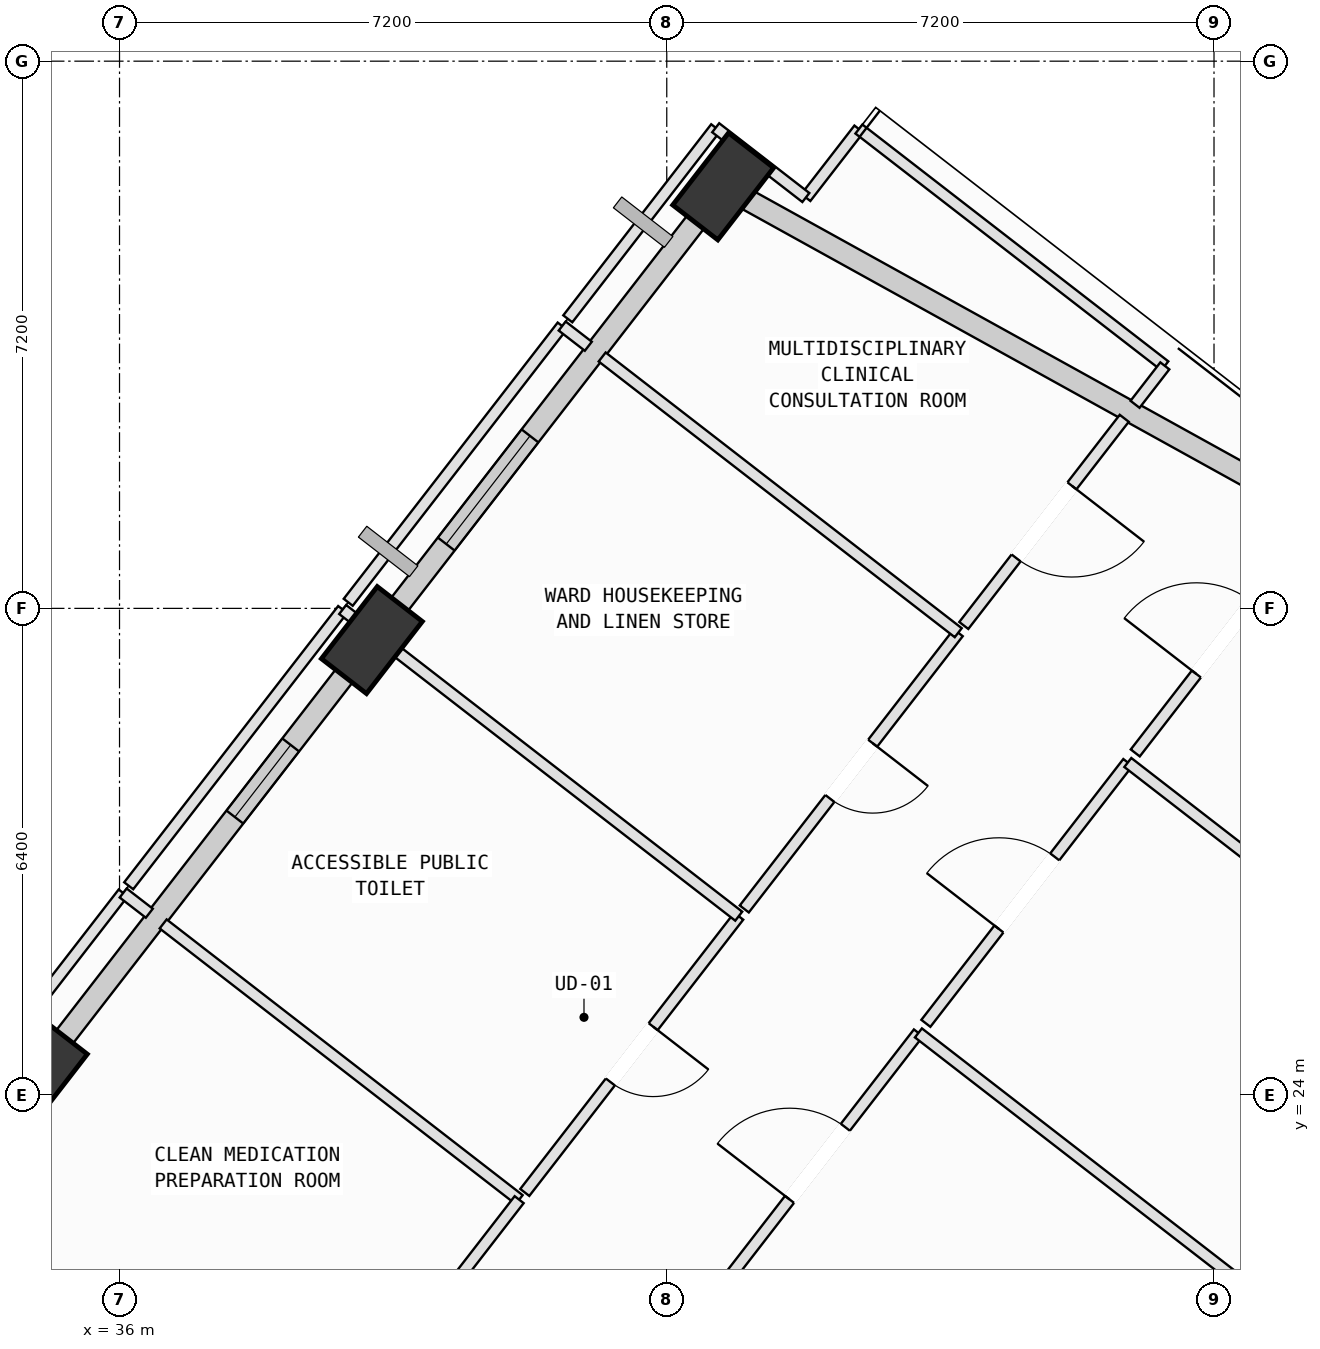
"""IFC4 building model, lengths in metres.
Left out: names, types, materials, properties, quantities, classifications, styles, units other than length and angle.
Written with IfcOpenShell. Run it as: python <this file> out.ifc"""

import sys

from ifc_helpers import new_model, si_unit, direction, frame, frame_2d, origin, origin_2d, place, context, subcontext, project, spatial, rectangle, extrude, element, fill, save


model = new_model("IFC4")
c1 = context("Model", 3, precision=1e-05, world=origin(), true_north=direction((0.0, 1.0)))
c2 = subcontext(c1, "Body", "Model", "MODEL_VIEW")
j1 = project(units=[si_unit("LENGTHUNIT", "METRE"), si_unit("PLANEANGLEUNIT", "RADIAN")], contexts=[c1])
p1 = place(None, origin())
s1 = spatial("IfcSite", under=j1, at=p1, CompositionType="ELEMENT")
p2 = place(p1, origin())
s2 = spatial("IfcBuilding", under=s1, at=p2, CompositionType="ELEMENT")
p3 = place(p2, frame((0.0, 0.0, 247.2)))
s3 = spatial("IfcBuildingStorey", under=s2, at=p3, CompositionType="ELEMENT", Elevation=247.2)
p4 = place(p3, frame((43.942, 35.953, 0.002), z_axis=(-0.046459283818, 0.042374281172, 0.998021019439), x_axis=(0.170478733113, -0.984106179386, 0.049719505731)))
e1 = element("IfcColumn", 1, at=p4, inside=s3, PredefinedType="COLUMN", context=c2, shape_type="SweptSolid", body=[
    extrude(rectangle(XDim=1.2, YDim=0.75, at=origin_2d()), origin(), (0.0, 0.0, 1.0), 4.004),
])
p5 = place(p3, frame((39.32, 29.983, 0.002), z_axis=(-0.021676245466, 0.023508040858, 0.999488625447), x_axis=(0.08563788715, -0.996005473508, 0.025283374503)))
e2 = element("IfcColumn", 2, at=p5, inside=s3, PredefinedType="COLUMN", context=c2, shape_type="SweptSolid", body=[
    extrude(rectangle(XDim=1.2, YDim=0.75, at=origin_2d()), origin(), (0.0, 0.0, 1.0), 3.998),
])
p6 = place(p3, frame((34.912, 24.29, 0.002), z_axis=(0.00207706177, 0.005437014634, 0.9999830622), x_axis=(-0.854072816538, -0.52013310368, 0.00460201124)))
e3 = element("IfcColumn", 3, at=p6, inside=s3, PredefinedType="COLUMN", context=c2, shape_type="SweptSolid", body=[
    extrude(rectangle(XDim=1.2, YDim=0.75, at=origin_2d()), origin(), (0.0, 0.0, 1.0), 3.996),
])
p7 = place(p3, frame((44.182, 35.82, 0.0), z_axis=(0.0, 0.0, 1.0), x_axis=(0.874960254065, -0.48419474781, 0.0)))
e4 = element("IfcWall", 4, at=p7, inside=s3, PredefinedType="SOLIDWALL", context=c2, shape_type="SweptSolid", body=[
    extrude(rectangle(XDim=9.036, YDim=0.28, at=frame_2d((4.518, 0.0))), origin(), (0.0, 0.0, 1.0), 3.265),
])
p8 = place(p3, frame((39.567, 30.302, 0.0), z_axis=(0.0, 0.0, 1.0), x_axis=(0.612201517758, 0.790701777951, 0.0)))
e5 = element("IfcWall", 5, at=p8, inside=s3, PredefinedType="SOLIDWALL", context=c2, shape_type="SweptSolid", body=[
    extrude(rectangle(XDim=6.78, YDim=0.28, at=frame_2d((3.39, 0.0))), origin(), (0.0, 0.0, 1.0), 3.265),
])
p9 = place(p8, frame((1.195, 0.0, 0.75)))
e6 = element("IfcOpeningElement", 6, at=p9, cuts=e5, PredefinedType="OPENING", context=c2, shape_type="SweptSolid", body=[
    extrude(rectangle(XDim=1.8, YDim=2.05, at=frame_2d((0.9, 1.025))), frame((0.0, 0.15, 0.0), z_axis=(0.0, -1.0, 0.0), x_axis=(1.0, 0.0, 0.0)), (0.0, 0.0, 1.0), 0.3),
])
p10 = place(p3, frame((35.163, 24.613, 0.0), z_axis=(0.0, 0.0, 1.0), x_axis=(0.612185484871, 0.790714191167, 0.0)))
e7 = element("IfcWall", 7, at=p10, inside=s3, PredefinedType="SOLIDWALL", context=c2, shape_type="SweptSolid", body=[
    extrude(rectangle(XDim=6.409, YDim=0.28, at=frame_2d((3.205, 0.0))), origin(), (0.0, 0.0, 1.0), 3.265),
])
p11 = place(p10, frame((3.847, 0.0, 0.75)))
e8 = element("IfcOpeningElement", 8, at=p11, cuts=e7, PredefinedType="OPENING", context=c2, shape_type="SweptSolid", body=[
    extrude(rectangle(XDim=1.2, YDim=1.75, at=frame_2d((0.6, 0.875))), frame((0.0, 0.15, 0.0), z_axis=(0.0, -1.0, 0.0), x_axis=(1.0, 0.0, 0.0)), (0.0, 0.0, 1.0), 0.3),
])
p12 = place(p3, frame((43.854, 21.382, 0.0), z_axis=(0.0, 0.0, 1.0), x_axis=(0.612178865646, 0.790719315849, 0.0)))
e9 = element("IfcWall", 9, at=p12, inside=s3, PredefinedType="PARTITIONING", context=c2, shape_type="SweptSolid", body=[
    extrude(rectangle(XDim=4.34, YDim=0.15, at=frame_2d((2.17, 0.0))), origin(), (0.0, 0.0, 1.0), 3.78),
])
p13 = place(p12, frame((1.57, 0.0, 0.0)))
e10 = element("IfcOpeningElement", 10, at=p13, cuts=e9, PredefinedType="OPENING", context=c2, shape_type="SweptSolid", body=[
    extrude(rectangle(XDim=1.2, YDim=2.15, at=frame_2d((0.6, 1.075))), frame((0.0, 0.085, 0.0), z_axis=(0.0, -1.0, 0.0), x_axis=(1.0, 0.0, 0.0)), (0.0, 0.0, 1.0), 0.17),
])
p14 = place(p3, frame((46.511, 24.814, 0.0), z_axis=(0.0, 0.0, 1.0), x_axis=(0.790690807158, -0.612215687055, 0.0)))
e11 = element("IfcWall", 11, at=p14, inside=s3, PredefinedType="PARTITIONING", context=c2, shape_type="SweptSolid", body=[
    extrude(rectangle(XDim=11.935, YDim=0.15, at=frame_2d((5.968, 0.0))), origin(), (0.0, 0.0, 1.0), 3.78),
])
p15 = place(p3, frame((46.609, 24.94, 0.0), z_axis=(0.0, 0.0, 1.0), x_axis=(0.612186806235, 0.790713168141, 0.0)))
e12 = element("IfcWall", 12, at=p15, inside=s3, PredefinedType="PARTITIONING", context=c2, shape_type="SweptSolid", body=[
    extrude(rectangle(XDim=4.341, YDim=0.15, at=frame_2d((2.17, 0.0))), origin(), (0.0, 0.0, 1.0), 3.78),
])
p16 = place(p15, frame((1.57, 0.0, 0.0)))
e13 = element("IfcOpeningElement", 13, at=p16, cuts=e12, PredefinedType="OPENING", context=c2, shape_type="SweptSolid", body=[
    extrude(rectangle(XDim=1.2, YDim=2.15, at=frame_2d((0.6, 1.075))), frame((0.0, 0.085, 0.0), z_axis=(0.0, -1.0, 0.0), x_axis=(1.0, 0.0, 0.0)), (0.0, 0.0, 1.0), 0.17),
])
p17 = place(p3, frame((49.266, 28.372, 0.0), z_axis=(0.0, 0.0, 1.0), x_axis=(0.790648548944, -0.612270260631, 0.0)))
e14 = element("IfcWall", 14, at=p17, inside=s3, PredefinedType="PARTITIONING", context=c2, shape_type="SweptSolid", body=[
    extrude(rectangle(XDim=11.363, YDim=0.15, at=frame_2d((5.681, 0.0))), origin(), (0.0, 0.0, 1.0), 3.78),
])
p18 = place(p3, frame((49.364, 28.498, 0.0), z_axis=(0.0, 0.0, 1.0), x_axis=(0.612238811962, 0.790672901475, 0.0)))
e15 = element("IfcWall", 15, at=p18, inside=s3, PredefinedType="PARTITIONING", context=c2, shape_type="SweptSolid", body=[
    extrude(rectangle(XDim=3.827, YDim=0.15, at=frame_2d((1.914, 0.0))), origin(), (0.0, 0.0, 1.0), 3.78),
])
p19 = place(p18, frame((1.313, 0.0, 0.0)))
e16 = element("IfcOpeningElement", 16, at=p19, cuts=e15, PredefinedType="OPENING", context=c2, shape_type="SweptSolid", body=[
    extrude(rectangle(XDim=1.2, YDim=2.15, at=frame_2d((0.6, 1.075))), frame((0.0, 0.085, 0.0), z_axis=(0.0, -1.0, 0.0), x_axis=(1.0, 0.0, 0.0)), (0.0, 0.0, 1.0), 0.17),
])
p20 = place(p3, frame((33.233, 23.019, 0.0), z_axis=(0.0, 0.0, 1.0), x_axis=(0.612204246351, 0.790699665328, 0.0)))
e17 = element("IfcWall", 17, at=p20, inside=s3, PredefinedType="PARTITIONING", context=c2, shape_type="SweptSolid", body=[
    extrude(rectangle(XDim=4.598, YDim=0.15, at=frame_2d((2.299, 0.0))), origin(), (0.0, 0.0, 1.0), 3.78),
])
p21 = place(p3, frame((36.048, 26.655, 0.0), z_axis=(0.0, 0.0, 1.0), x_axis=(0.790951555594, -0.611878776151, 0.0)))
e18 = element("IfcWall", 18, at=p21, inside=s3, PredefinedType="PARTITIONING", context=c2, shape_type="SweptSolid", body=[
    extrude(rectangle(XDim=0.435, YDim=0.15, at=frame_2d((0.217, 0.0))), origin(), (0.0, 0.0, 1.0), 3.78),
])
p22 = place(p3, frame((36.574, 26.248, 0.0), z_axis=(0.0, 0.0, 1.0), x_axis=(0.790597576491, -0.612336077695, 0.0)))
e19 = element("IfcWall", 19, at=p22, inside=s3, PredefinedType="PARTITIONING", context=c2, shape_type="SweptSolid", body=[
    extrude(rectangle(XDim=5.925, YDim=0.15, at=frame_2d((2.962, 0.0))), origin(), (0.0, 0.0, 1.0), 3.78),
])
p23 = place(p3, frame((41.258, 22.62, 0.0), z_axis=(0.0, 0.0, 1.0), x_axis=(-0.612141082287, -0.790748566472, 0.0)))
e20 = element("IfcWall", 20, at=p23, inside=s3, PredefinedType="PARTITIONING", context=c2, shape_type="SweptSolid", body=[
    extrude(rectangle(XDim=2.454, YDim=0.15, at=frame_2d((1.227, 0.0))), origin(), (0.0, 0.0, 1.0), 3.78),
])
p24 = place(p3, frame((36.255, 20.68, 0.0), z_axis=(0.0, 0.0, 1.0), x_axis=(-0.79074544755, 0.612145111211, 0.0)))
e21 = element("IfcWall", 21, at=p24, inside=s3, PredefinedType="PARTITIONING", context=c2, shape_type="SweptSolid", body=[
    extrude(rectangle(XDim=3.156, YDim=0.15, at=frame_2d((1.578, 0.0))), origin(), (0.0, 0.0, 1.0), 3.78),
])
p25 = place(p3, frame((44.147, 26.35, 0.0), z_axis=(0.0, 0.0, 1.0), x_axis=(-0.612273865453, -0.790645757393, 0.0)))
e22 = element("IfcWall", 22, at=p25, inside=s3, PredefinedType="PARTITIONING", context=c2, shape_type="SweptSolid", body=[
    extrude(rectangle(XDim=4.597, YDim=0.15, at=frame_2d((2.299, 0.0))), origin(), (0.0, 0.0, 1.0), 3.78),
])
p26 = place(p25, frame((1.839, 0.0, 0.0)))
e23 = element("IfcOpeningElement", 23, at=p26, cuts=e22, PredefinedType="OPENING", context=c2, shape_type="SweptSolid", body=[
    extrude(rectangle(XDim=0.92, YDim=2.1, at=frame_2d((0.46, 1.05))), frame((0.0, 0.085, 0.0), z_axis=(0.0, -1.0, 0.0), x_axis=(1.0, 0.0, 0.0)), (0.0, 0.0, 1.0), 0.17),
])
p27 = place(p3, frame((36.121, 26.75, 0.0), z_axis=(0.0, 0.0, 1.0), x_axis=(0.612273865453, 0.790645757393, 0.0)))
e24 = element("IfcWall", 24, at=p27, inside=s3, PredefinedType="PARTITIONING", context=c2, shape_type="SweptSolid", body=[
    extrude(rectangle(XDim=4.597, YDim=0.15, at=frame_2d((2.299, 0.0))), origin(), (0.0, 0.0, 1.0), 3.265),
])
p28 = place(p3, frame((38.936, 30.385, 0.0), z_axis=(0.0, 0.0, 1.0), x_axis=(0.790676851413, -0.6122337108, 0.0)))
e25 = element("IfcWall", 25, at=p28, inside=s3, PredefinedType="PARTITIONING", context=c2, shape_type="SweptSolid", body=[
    extrude(rectangle(XDim=6.591, YDim=0.15, at=frame_2d((3.295, 0.0))), origin(), (0.0, 0.0, 1.0), 3.78),
])
p29 = place(p3, frame((47.035, 30.08, 0.0), z_axis=(0.0, 0.0, 1.0), x_axis=(-0.612273865453, -0.790645757393, 0.0)))
e26 = element("IfcWall", 26, at=p29, inside=s3, PredefinedType="PARTITIONING", context=c2, shape_type="SweptSolid", body=[
    extrude(rectangle(XDim=4.597, YDim=0.15, at=frame_2d((2.299, 0.0))), origin(), (0.0, 0.0, 1.0), 3.78),
])
p30 = place(p29, frame((1.839, 0.0, 0.0)))
e27 = element("IfcOpeningElement", 27, at=p30, cuts=e26, PredefinedType="OPENING", context=c2, shape_type="SweptSolid", body=[
    extrude(rectangle(XDim=0.92, YDim=2.1, at=frame_2d((0.46, 1.05))), frame((0.0, 0.085, 0.0), z_axis=(0.0, -1.0, 0.0), x_axis=(1.0, 0.0, 0.0)), (0.0, 0.0, 1.0), 0.17),
])
p31 = place(p3, frame((39.009, 30.48, 0.0), z_axis=(0.0, 0.0, 1.0), x_axis=(0.612273865453, 0.790645757393, 0.0)))
e28 = element("IfcWall", 28, at=p31, inside=s3, PredefinedType="PARTITIONING", context=c2, shape_type="SweptSolid", body=[
    extrude(rectangle(XDim=4.597, YDim=0.15, at=frame_2d((2.299, 0.0))), origin(), (0.0, 0.0, 1.0), 3.265),
])
p32 = place(p3, frame((41.824, 34.115, 0.0), z_axis=(0.0, 0.0, 1.0), x_axis=(0.791223248706, -0.611527407978, 0.0)))
e29 = element("IfcWall", 29, at=p32, inside=s3, PredefinedType="PARTITIONING", context=c2, shape_type="SweptSolid", body=[
    extrude(rectangle(XDim=0.435, YDim=0.15, at=frame_2d((0.217, 0.0))), origin(), (0.0, 0.0, 1.0), 3.78),
])
p33 = place(p3, frame((42.35, 33.708, 0.0), z_axis=(0.0, 0.0, 1.0), x_axis=(0.790643922071, -0.612276235446, 0.0)))
e30 = element("IfcWall", 30, at=p33, inside=s3, PredefinedType="PARTITIONING", context=c2, shape_type="SweptSolid", body=[
    extrude(rectangle(XDim=5.925, YDim=0.15, at=frame_2d((2.963, 0.0))), origin(), (0.0, 0.0, 1.0), 3.78),
])
p34 = place(p3, frame((45.03, 35.806, 0.0), z_axis=(0.0, 0.0, 1.0), x_axis=(0.612367575436, 0.79057317976, 0.0)))
e31 = element("IfcWall", 31, at=p34, inside=s3, PredefinedType="PARTITIONING", context=c2, shape_type="SweptSolid", body=[
    extrude(rectangle(XDim=1.14, YDim=0.15, at=frame_2d((0.57, 0.0))), origin(), (0.0, 0.0, 1.0), 3.78),
])
p35 = place(p3, frame((45.728, 36.707, 0.0), z_axis=(0.0, 0.0, 1.0), x_axis=(0.790731945965, -0.612162551641, 0.0)))
e32 = element("IfcWall", 32, at=p35, inside=s3, PredefinedType="PARTITIONING", context=c2, shape_type="SweptSolid", body=[
    extrude(rectangle(XDim=5.09, YDim=0.15, at=frame_2d((2.545, 0.0))), origin(), (0.0, 0.0, 1.0), 3.78),
])
p36 = place(p3, frame((49.753, 33.591, 0.0), z_axis=(0.0, 0.0, 1.0), x_axis=(-0.612196272142, -0.790705839346, 0.0)))
e33 = element("IfcWall", 33, at=p36, inside=s3, PredefinedType="PARTITIONING", context=c2, shape_type="SweptSolid", body=[
    extrude(rectangle(XDim=0.64, YDim=0.15, at=frame_2d((0.32, 0.0))), origin(), (0.0, 0.0, 1.0), 3.78),
])
p37 = place(p3, frame((49.219, 32.901, 0.0), z_axis=(0.0, 0.0, 1.0), x_axis=(-0.612311720881, -0.790616440805, 0.0)))
e34 = element("IfcWall", 34, at=p37, inside=s3, PredefinedType="PARTITIONING", context=c2, shape_type="SweptSolid", body=[
    extrude(rectangle(XDim=3.448, YDim=0.15, at=frame_2d((1.724, 0.0))), origin(), (0.0, 0.0, 1.0), 3.78),
])
p38 = place(p37, frame((1.124, 0.0, 0.0)))
e35 = element("IfcOpeningElement", 35, at=p38, cuts=e34, PredefinedType="OPENING", context=c2, shape_type="SweptSolid", body=[
    extrude(rectangle(XDim=1.2, YDim=2.15, at=frame_2d((0.6, 1.075))), frame((0.0, 0.085, 0.0), z_axis=(0.0, -1.0, 0.0), x_axis=(1.0, 0.0, 0.0)), (0.0, 0.0, 1.0), 0.17),
])
p39 = place(p3, frame((41.898, 34.21, 0.0), z_axis=(0.0, 0.0, 1.0), x_axis=(0.612094201511, 0.790784855998, 0.0)))
e36 = element("IfcWall", 36, at=p39, inside=s3, PredefinedType="PARTITIONING", context=c2, shape_type="SweptSolid", body=[
    extrude(rectangle(XDim=3.179, YDim=0.15, at=frame_2d((1.59, 0.0))), origin(), (0.0, 0.0, 1.0), 3.265),
])
p40 = place(p3, frame((43.844, 36.724, 0.0), z_axis=(0.0, 0.0, 1.0), x_axis=(0.7907262492, -0.612169910095, 0.0)))
e37 = element("IfcWall", 37, at=p40, inside=s3, PredefinedType="PARTITIONING", context=c2, shape_type="SweptSolid", body=[
    extrude(rectangle(XDim=1.5, YDim=0.15, at=frame_2d((0.75, 0.0))), origin(), (0.0, 0.0, 1.0), 3.265),
])
p41 = place(p9, origin())
e38 = element("IfcWindow", 38, at=p41, inside=s3, PartitioningType="SINGLE_PANEL", PredefinedType="WINDOW", context=c2, shape_type="SweptSolid", body=[
    extrude(rectangle(XDim=1.8, YDim=2.05, at=frame_2d((0.9, 1.025))), frame((0.0, 0.03, 0.0), z_axis=(0.0, -1.0, 0.0), x_axis=(1.0, 0.0, 0.0)), (0.0, 0.0, 1.0), 0.06),
])
fill(e6, e38)
p42 = place(p11, origin())
e39 = element("IfcWindow", 39, at=p42, inside=s3, PartitioningType="SINGLE_PANEL", PredefinedType="WINDOW", context=c2, shape_type="SweptSolid", body=[
    extrude(rectangle(XDim=1.2, YDim=1.75, at=frame_2d((0.6, 0.875))), frame((0.0, 0.03, 0.0), z_axis=(0.0, -1.0, 0.0), x_axis=(1.0, 0.0, 0.0)), (0.0, 0.0, 1.0), 0.06),
])
fill(e8, e39)
p43 = place(p13, origin())
e40 = element("IfcDoor", 40, at=p43, inside=s3, OperationType="SINGLE_SWING_LEFT", PredefinedType="DOOR", context=c2, shape_type="SweptSolid", body=[
    extrude(rectangle(XDim=1.2, YDim=2.15, at=frame_2d((0.6, 1.075))), frame((0.0, 0.025, 0.0), z_axis=(0.0, -1.0, 0.0), x_axis=(1.0, 0.0, 0.0)), (0.0, 0.0, 1.0), 0.05),
])
fill(e10, e40)
p44 = place(p16, origin())
e41 = element("IfcDoor", 41, at=p44, inside=s3, OperationType="SINGLE_SWING_LEFT", PredefinedType="DOOR", context=c2, shape_type="SweptSolid", body=[
    extrude(rectangle(XDim=1.2, YDim=2.15, at=frame_2d((0.6, 1.075))), frame((0.0, 0.025, 0.0), z_axis=(0.0, -1.0, 0.0), x_axis=(1.0, 0.0, 0.0)), (0.0, 0.0, 1.0), 0.05),
])
fill(e13, e41)
p45 = place(p19, origin())
e42 = element("IfcDoor", 42, at=p45, inside=s3, OperationType="SINGLE_SWING_LEFT", PredefinedType="DOOR", context=c2, shape_type="SweptSolid", body=[
    extrude(rectangle(XDim=1.2, YDim=2.15, at=frame_2d((0.6, 1.075))), frame((0.0, 0.025, 0.0), z_axis=(0.0, -1.0, 0.0), x_axis=(1.0, 0.0, 0.0)), (0.0, 0.0, 1.0), 0.05),
])
fill(e16, e42)
p46 = place(p26, origin())
e43 = element("IfcDoor", 43, at=p46, inside=s3, OperationType="SINGLE_SWING_LEFT", PredefinedType="DOOR", context=c2, shape_type="SweptSolid", body=[
    extrude(rectangle(XDim=0.92, YDim=2.1, at=frame_2d((0.46, 1.05))), frame((0.0, 0.025, 0.0), z_axis=(0.0, -1.0, 0.0), x_axis=(1.0, 0.0, 0.0)), (0.0, 0.0, 1.0), 0.05),
])
fill(e23, e43)
p47 = place(p30, origin())
e44 = element("IfcDoor", 44, at=p47, inside=s3, OperationType="SINGLE_SWING_LEFT", PredefinedType="DOOR", context=c2, shape_type="SweptSolid", body=[
    extrude(rectangle(XDim=0.92, YDim=2.1, at=frame_2d((0.46, 1.05))), frame((0.0, 0.025, 0.0), z_axis=(0.0, -1.0, 0.0), x_axis=(1.0, 0.0, 0.0)), (0.0, 0.0, 1.0), 0.05),
])
fill(e27, e44)
p48 = place(p38, origin())
e45 = element("IfcDoor", 45, at=p48, inside=s3, OperationType="SINGLE_SWING_LEFT", PredefinedType="DOOR", context=c2, shape_type="SweptSolid", body=[
    extrude(rectangle(XDim=1.2, YDim=2.15, at=frame_2d((0.6, 1.075))), frame((0.0, 0.025, 0.0), z_axis=(0.0, -1.0, 0.0), x_axis=(1.0, 0.0, 0.0)), (0.0, 0.0, 1.0), 0.05),
])
fill(e35, e45)
save(model, sys.argv[1])
